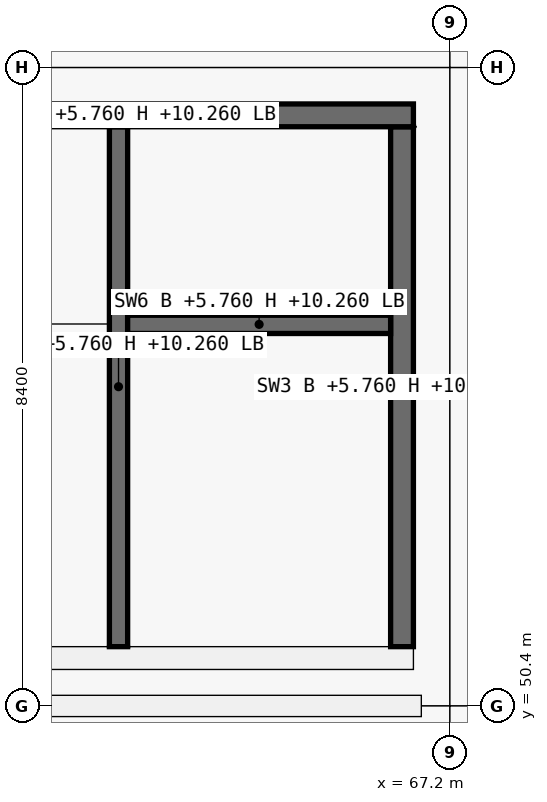
"""IFC4 building model, lengths in metres.
Left out: names, types, materials, properties, quantities, classifications, styles, units other than length and angle.
Written with IfcOpenShell. Run it as: python <this file> out.ifc"""

import sys

from ifc_helpers import new_model, si_unit, direction, frame, frame_2d, origin, origin_2d, place, context, subcontext, project, spatial, rectangle, extrude, element, fill, save


model = new_model("IFC4")
c1 = context("Model", 3, precision=1e-05, world=origin(), true_north=direction((0.0, 1.0)))
c2 = subcontext(c1, "Body", "Model", "MODEL_VIEW")
j1 = project(units=[si_unit("LENGTHUNIT", "METRE"), si_unit("PLANEANGLEUNIT", "RADIAN")], contexts=[c1])
p1 = place(None, origin())
s1 = spatial("IfcSite", under=j1, at=p1, CompositionType="ELEMENT")
p2 = place(p1, origin())
s2 = spatial("IfcBuilding", under=s1, at=p2, CompositionType="ELEMENT")
p3 = place(p2, frame((0.0, 0.0, 5.76)))
s3 = spatial("IfcBuildingStorey", under=s2, at=p3, CompositionType="ELEMENT", Elevation=5.76)
p4 = place(p3, frame((67.2, 50.4, 0.0), z_axis=(0.0, 0.0, 1.0), x_axis=(1.0, 0.0, 0.0)))
e1 = element("IfcColumn", 1, at=p4, inside=s3, PredefinedType="COLUMN", context=c2, shape_type="SweptSolid", body=[
    extrude(rectangle(XDim=0.75, YDim=0.75, at=origin_2d()), origin(), (0.0, 0.0, 1.0), 4.5),
])
p5 = place(p3, frame((67.2, 58.8, 0.0), z_axis=(0.0, 0.0, 1.0), x_axis=(1.0, 0.0, 0.0)))
e2 = element("IfcColumn", 2, at=p5, inside=s3, PredefinedType="COLUMN", context=c2, shape_type="SweptSolid", body=[
    extrude(rectangle(XDim=0.7, YDim=0.7, at=origin_2d()), origin(), (0.0, 0.0, 1.0), 4.5),
])
p6 = place(p3, frame((66.824, 50.4, 0.0), z_axis=(0.0, 0.0, 1.0), x_axis=(-1.0, 0.0, 0.0)))
e3 = element("IfcWall", 3, at=p6, inside=s3, PredefinedType="SOLIDWALL", context=c2, shape_type="SweptSolid", body=[
    extrude(rectangle(XDim=7.673, YDim=0.28, at=frame_2d((3.836, 0.0))), origin(), (0.0, 0.0, 1.0), 3.4),
])
for number, where, z_axis, x_axis in (
    (4, (66.72, 51.03, 0.0), (0.0, 0.0, 1.0), (-1.0, 0.0, 0.0)),
    (5, (59.28, 58.17, 0.0), (0.0, 0.0, 1.0), (1.0, 0.0, 0.0)),
):
    element("IfcWall", number, at=place(p3, frame(where, z_axis=z_axis, x_axis=x_axis)), inside=s3, PredefinedType="SHEAR", context=c2, shape_type="SweptSolid", body=[
        extrude(rectangle(XDim=7.44, YDim=0.3, at=frame_2d((3.72, 0.0))), origin(), (0.0, 0.0, 1.0), 4.5),
    ])
p7 = place(p3, frame((66.57, 58.02, 0.0), z_axis=(0.0, 0.0, 1.0), x_axis=(0.0, -1.0, 0.0)))
e6 = element("IfcWall", 6, at=p7, inside=s3, PredefinedType="SHEAR", context=c2, shape_type="SweptSolid", body=[
    extrude(rectangle(XDim=6.84, YDim=0.3, at=frame_2d((3.42, 0.0))), origin(), (0.0, 0.0, 1.0), 4.5),
])
p8 = place(p7, frame((3.97, 0.0, 0.0)))
e7 = element("IfcOpeningElement", 7, at=p8, cuts=e6, PredefinedType="OPENING", context=c2, shape_type="SweptSolid", body=[
    extrude(rectangle(XDim=1.5, YDim=2.15, at=frame_2d((0.75, 1.075))), frame((0.0, 0.15, 0.0), z_axis=(0.0, -1.0, 0.0), x_axis=(1.0, 0.0, 0.0)), (0.0, 0.0, 1.0), 0.3),
])
p9 = place(p3, frame((62.84, 51.18, 0.0), z_axis=(0.0, 0.0, 1.0), x_axis=(0.0, 1.0, 0.0)))
e8 = element("IfcWall", 8, at=p9, inside=s3, PredefinedType="SHEAR", context=c2, shape_type="SweptSolid", body=[
    extrude(rectangle(XDim=6.84, YDim=0.24, at=frame_2d((3.42, 0.0))), origin(), (0.0, 0.0, 1.0), 4.5),
])
p10 = place(p9, frame((0.12, 0.0, 0.0)))
e9 = element("IfcOpeningElement", 9, at=p10, cuts=e8, PredefinedType="OPENING", context=c2, shape_type="SweptSolid", body=[
    extrude(rectangle(XDim=1.0, YDim=2.15, at=frame_2d((0.5, 1.075))), frame((0.0, 0.12, 0.0), z_axis=(0.0, -1.0, 0.0), x_axis=(1.0, 0.0, 0.0)), (0.0, 0.0, 1.0), 0.24),
])
p11 = place(p3, frame((62.96, 55.42, 0.0), z_axis=(0.0, 0.0, 1.0), x_axis=(1.0, 0.0, 0.0)))
e10 = element("IfcWall", 10, at=p11, inside=s3, PredefinedType="SHEAR", context=c2, shape_type="SweptSolid", body=[
    extrude(rectangle(XDim=3.46, YDim=0.24, at=frame_2d((1.73, 0.0))), origin(), (0.0, 0.0, 1.0), 4.5),
])
p12 = place(p11, frame((1.18, 0.0, 0.0)))
e11 = element("IfcOpeningElement", 11, at=p12, cuts=e10, PredefinedType="OPENING", context=c2, shape_type="SweptSolid", body=[
    extrude(rectangle(XDim=1.1, YDim=2.15, at=frame_2d((0.55, 1.075))), frame((0.0, 0.12, 0.0), z_axis=(0.0, -1.0, 0.0), x_axis=(1.0, 0.0, 0.0)), (0.0, 0.0, 1.0), 0.24),
])
p13 = place(p10, origin())
e12 = element("IfcDoor", 12, at=p13, inside=s3, OperationType="SINGLE_SWING_RIGHT", PredefinedType="DOOR", context=c2, shape_type="SweptSolid", body=[
    extrude(rectangle(XDim=1.0, YDim=2.15, at=frame_2d((0.5, 1.075))), frame((0.0, 0.025, 0.0), z_axis=(0.0, -1.0, 0.0), x_axis=(1.0, 0.0, 0.0)), (0.0, 0.0, 1.0), 0.05),
])
fill(e9, e12)
p14 = place(p8, origin())
e13 = element("IfcDoor", 13, at=p14, inside=s3, OperationType="DOUBLE_DOOR_SINGLE_SWING", PredefinedType="DOOR", context=c2, shape_type="SweptSolid", body=[
    extrude(rectangle(XDim=1.5, YDim=2.15, at=frame_2d((0.75, 1.075))), frame((0.0, 0.025, 0.0), z_axis=(0.0, -1.0, 0.0), x_axis=(1.0, 0.0, 0.0)), (0.0, 0.0, 1.0), 0.05),
])
fill(e7, e13)
p15 = place(p12, origin())
e14 = element("IfcDoor", 14, at=p15, inside=s3, OperationType="DOUBLE_DOOR_SLIDING", PredefinedType="DOOR", context=c2, shape_type="SweptSolid", body=[
    extrude(rectangle(XDim=1.1, YDim=2.15, at=frame_2d((0.55, 1.075))), frame((0.0, 0.025, 0.0), z_axis=(0.0, -1.0, 0.0), x_axis=(1.0, 0.0, 0.0)), (0.0, 0.0, 1.0), 0.05),
])
fill(e11, e14)
save(model, sys.argv[1])
